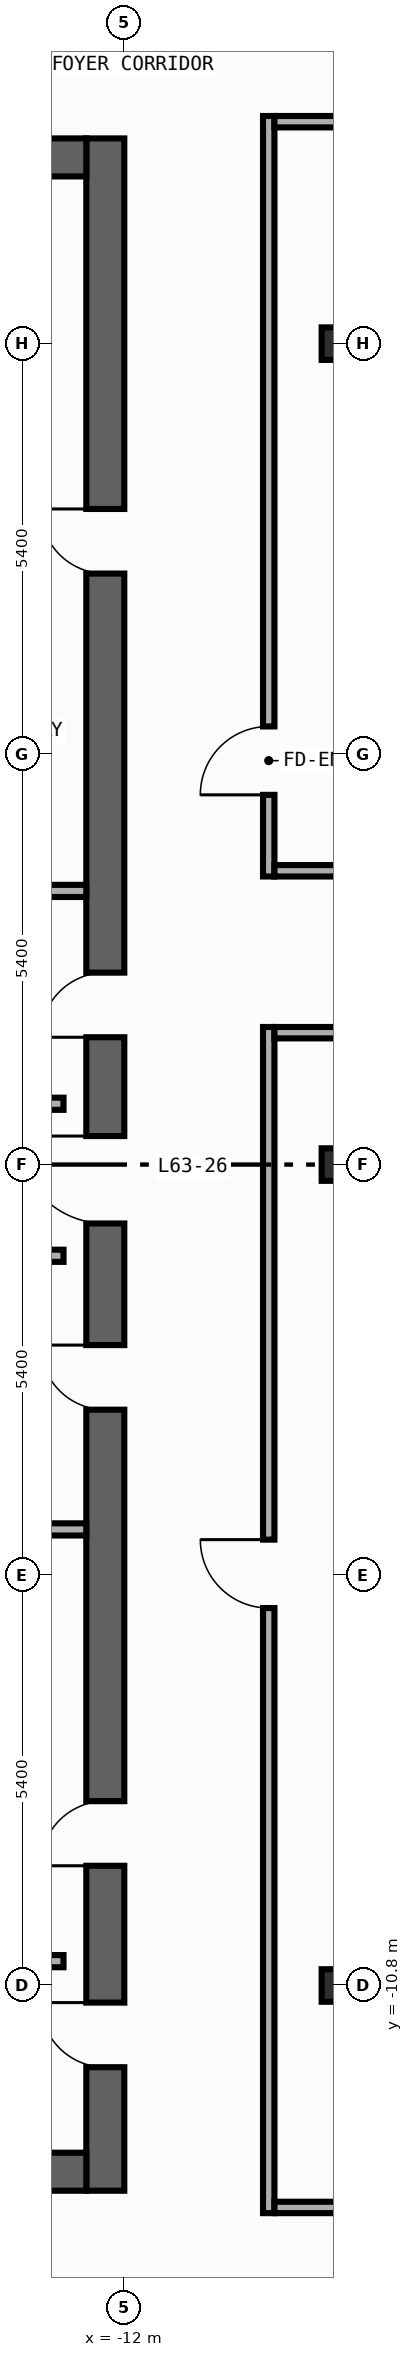
"""IFC4 building model, lengths in metres.
Left out: names, types, materials, properties, quantities, classifications, styles, units other than length and angle.
Written with IfcOpenShell. Run it as: python <this file> out.ifc"""

import sys

from ifc_helpers import new_model, si_unit, direction, frame, frame_2d, origin, origin_2d, place, context, subcontext, project, spatial, rectangle, i_section, extrude, element, fill, save


model = new_model("IFC4")
c1 = context("Model", 3, precision=1e-05, world=origin(), true_north=direction((0.0, 1.0)))
c2 = subcontext(c1, "Body", "Model", "MODEL_VIEW")
j1 = project(units=[si_unit("LENGTHUNIT", "METRE"), si_unit("PLANEANGLEUNIT", "RADIAN")], contexts=[c1])
p1 = place(None, origin())
s1 = spatial("IfcSite", under=j1, at=p1, CompositionType="ELEMENT")
p2 = place(p1, origin())
s2 = spatial("IfcBuilding", under=s1, at=p2, CompositionType="ELEMENT")
p3 = place(p2, frame((0.0, 0.0, 265.6)))
s3 = spatial("IfcBuildingStorey", under=s2, at=p3, CompositionType="ELEMENT", Elevation=265.6)
p4 = place(p3, frame((-12.25, -13.5, 0.0), z_axis=(0.0, 0.0, 1.0), x_axis=(0.0, 1.0, 0.0)))
e1 = element("IfcWall", 1, at=p4, inside=s3, PredefinedType="SHEAR", context=c2, shape_type="SweptSolid", body=[
    extrude(rectangle(XDim=27.0, YDim=0.5, at=frame_2d((13.5, 0.0))), origin(), (0.0, 0.0, 1.0), 3.34),
])
p5 = place(p4, frame((15.175, 0.0, 0.0)))
e2 = element("IfcOpeningElement", 2, at=p5, cuts=e1, PredefinedType="OPENING", context=c2, shape_type="SweptSolid", body=[
    extrude(rectangle(XDim=0.85, YDim=2.1, at=frame_2d((0.425, 1.05))), frame((0.0, 0.26, 0.0), z_axis=(0.0, -1.0, 0.0), x_axis=(1.0, 0.0, 0.0)), (0.0, 0.0, 1.0), 0.52),
])
p6 = place(p4, frame((21.275, 0.0, 0.0)))
e3 = element("IfcOpeningElement", 3, at=p6, cuts=e1, PredefinedType="OPENING", context=c2, shape_type="SweptSolid", body=[
    extrude(rectangle(XDim=0.85, YDim=2.1, at=frame_2d((0.425, 1.05))), frame((0.0, 0.26, 0.0), z_axis=(0.0, -1.0, 0.0), x_axis=(1.0, 0.0, 0.0)), (0.0, 0.0, 1.0), 0.52),
])
p7 = place(p4, frame((4.275, 0.0, 0.0)))
e4 = element("IfcOpeningElement", 4, at=p7, cuts=e1, PredefinedType="OPENING", context=c2, shape_type="SweptSolid", body=[
    extrude(rectangle(XDim=0.85, YDim=2.1, at=frame_2d((0.425, 1.05))), frame((0.0, 0.26, 0.0), z_axis=(0.0, -1.0, 0.0), x_axis=(1.0, 0.0, 0.0)), (0.0, 0.0, 1.0), 0.52),
])
p8 = place(p4, frame((10.275, 0.0, 0.0)))
e5 = element("IfcOpeningElement", 5, at=p8, cuts=e1, PredefinedType="OPENING", context=c2, shape_type="SweptSolid", body=[
    extrude(rectangle(XDim=0.85, YDim=2.1, at=frame_2d((0.425, 1.05))), frame((0.0, 0.26, 0.0), z_axis=(0.0, -1.0, 0.0), x_axis=(1.0, 0.0, 0.0)), (0.0, 0.0, 1.0), 0.52),
])
p9 = place(p4, frame((12.725, 0.0, 0.0)))
e6 = element("IfcOpeningElement", 6, at=p9, cuts=e1, PredefinedType="OPENING", context=c2, shape_type="SweptSolid", body=[
    extrude(rectangle(XDim=1.15, YDim=2.2, at=frame_2d((0.575, 1.1))), frame((0.0, 0.26, 0.0), z_axis=(0.0, -1.0, 0.0), x_axis=(1.0, 0.0, 0.0)), (0.0, 0.0, 1.0), 0.52),
])
p10 = place(p4, frame((1.625, 0.0, 0.0)))
e7 = element("IfcOpeningElement", 7, at=p10, cuts=e1, PredefinedType="OPENING", context=c2, shape_type="SweptSolid", body=[
    extrude(rectangle(XDim=0.85, YDim=2.1, at=frame_2d((0.425, 1.05))), frame((0.0, 0.26, 0.0), z_axis=(0.0, -1.0, 0.0), x_axis=(1.0, 0.0, 0.0)), (0.0, 0.0, 1.0), 0.52),
])
for number, where, z_axis, x_axis in (
    (8, (-19.9, -13.25, 0.0), (0.0, 0.0, 1.0), (1.0, 0.0, 0.0)),
    (9, (-19.9, 13.25, 0.0), (0.0, 0.0, 1.0), (1.0, 0.0, 0.0)),
):
    element("IfcWall", number, at=place(p3, frame(where, z_axis=z_axis, x_axis=x_axis)), inside=s3, PredefinedType="SHEAR", context=c2, shape_type="SweptSolid", body=[
        extrude(rectangle(XDim=7.4, YDim=0.5, at=frame_2d((3.7, 0.0))), origin(), (0.0, 0.0, 1.0), 3.34),
    ])
for number, where, z_axis, x_axis in (
    (10, (-9.2, -10.8, 0.0), (0.0, 0.0, 1.0), (1.0, 0.0, 0.0)),
    (11, (-9.2, 0.0, 0.0), (0.0, 0.0, 1.0), (1.0, 0.0, 0.0)),
    (12, (-9.2, 10.8, 0.0), (0.0, 0.0, 1.0), (1.0, 0.0, 0.0)),
):
    element("IfcColumn", number, at=place(p3, frame(where, z_axis=z_axis, x_axis=x_axis)), inside=s3, PredefinedType="COLUMN", context=c2, shape_type="SweptSolid", body=[
        extrude(i_section(OverallWidth=0.407, OverallDepth=0.428, WebThickness=0.02, FlangeThickness=0.035, FilletRadius=0.022, at=origin_2d()), origin(), (0.0, 0.0, 1.0), 3.6),
    ])
for number, where, z_axis, x_axis in (
    (13, (-15.4, 0.8, 0.0), (0.0, 0.0, 1.0), (1.0, 0.0, 0.0)),
    (14, (-15.4, -1.2, 0.0), (0.0, 0.0, 1.0), (1.0, 0.0, 0.0)),
    (15, (-15.4, -10.48, 0.0), (0.0, 0.0, 1.0), (1.0, 0.0, 0.0)),
):
    element("IfcWall", number, at=place(p3, frame(where, z_axis=z_axis, x_axis=x_axis)), inside=s3, PredefinedType="STANDARD", context=c2, shape_type="SweptSolid", body=[
        extrude(rectangle(XDim=2.6, YDim=0.16, at=frame_2d((1.3, 0.0))), origin(), (0.0, 0.0, 1.0), 3.34),
    ])
for number, where, z_axis, x_axis in (
    (16, (-15.4, 3.6, 0.0), (0.0, 0.0, 1.0), (1.0, 0.0, 0.0)),
    (17, (-15.4, -4.8, 0.0), (0.0, 0.0, 1.0), (1.0, 0.0, 0.0)),
):
    element("IfcWall", number, at=place(p3, frame(where, z_axis=z_axis, x_axis=x_axis)), inside=s3, PredefinedType="PARTITIONING", context=c2, shape_type="SweptSolid", body=[
        extrude(rectangle(XDim=2.9, YDim=0.16, at=frame_2d((1.45, 0.0))), origin(), (0.0, 0.0, 1.0), 3.34),
    ])
p11 = place(p3, frame((-10.1, 3.79, 0.0), z_axis=(0.0, 0.0, 1.0), x_axis=(0.0, 1.0, 0.0)))
e18 = element("IfcWall", 18, at=p11, inside=s3, PredefinedType="PARTITIONING", context=c2, shape_type="SweptSolid", body=[
    extrude(rectangle(XDim=10.005, YDim=0.15, at=frame_2d((5.002, 0.0))), origin(), (0.0, 0.0, 1.0), 3.34),
])
p12 = place(p11, frame((1.074, 0.0, 0.0)))
e19 = element("IfcOpeningElement", 19, at=p12, cuts=e18, PredefinedType="OPENING", context=c2, shape_type="SweptSolid", body=[
    extrude(rectangle(XDim=0.9, YDim=2.15, at=frame_2d((0.45, 1.075))), frame((0.0, 0.085, 0.0), z_axis=(0.0, -1.0, 0.0), x_axis=(1.0, 0.0, 0.0)), (0.0, 0.0, 1.0), 0.17),
])
p13 = place(p3, frame((-10.1, -13.795, 0.0), z_axis=(0.0, 0.0, 1.0), x_axis=(0.0, 1.0, 0.0)))
e20 = element("IfcWall", 20, at=p13, inside=s3, PredefinedType="PARTITIONING", context=c2, shape_type="SweptSolid", body=[
    extrude(rectangle(XDim=15.605, YDim=0.15, at=frame_2d((7.802, 0.0))), origin(), (0.0, 0.0, 1.0), 3.34),
])
p14 = place(p13, frame((7.961, 0.0, 0.0)))
e21 = element("IfcOpeningElement", 21, at=p14, cuts=e20, PredefinedType="OPENING", context=c2, shape_type="SweptSolid", body=[
    extrude(rectangle(XDim=0.9, YDim=2.15, at=frame_2d((0.45, 1.075))), frame((0.0, 0.085, 0.0), z_axis=(0.0, -1.0, 0.0), x_axis=(1.0, 0.0, 0.0)), (0.0, 0.0, 1.0), 0.17),
])
p15 = place(p3, frame((-10.025, 3.865, 0.0), z_axis=(0.0, 0.0, 1.0), x_axis=(1.0, 0.0, 0.0)))
e22 = element("IfcWall", 22, at=p15, inside=s3, PredefinedType="PARTITIONING", context=c2, shape_type="SweptSolid", body=[
    extrude(rectangle(XDim=12.055, YDim=0.15, at=frame_2d((6.027, 0.0))), origin(), (0.0, 0.0, 1.0), 3.34),
])
p16 = place(p15, frame((9.491, 0.0, 0.0)))
e23 = element("IfcOpeningElement", 23, at=p16, cuts=e22, PredefinedType="OPENING", context=c2, shape_type="SweptSolid", body=[
    extrude(rectangle(XDim=0.9, YDim=2.15, at=frame_2d((0.45, 1.075))), frame((0.0, 0.085, 0.0), z_axis=(0.0, -1.0, 0.0), x_axis=(1.0, 0.0, 0.0)), (0.0, 0.0, 1.0), 0.17),
])
p17 = place(p3, frame((-10.025, 1.735, 0.0), z_axis=(0.0, 0.0, 1.0), x_axis=(1.0, 0.0, 0.0)))
e24 = element("IfcWall", 24, at=p17, inside=s3, PredefinedType="PARTITIONING", context=c2, shape_type="SweptSolid", body=[
    extrude(rectangle(XDim=12.035, YDim=0.15, at=frame_2d((6.018, 0.0))), origin(), (0.0, 0.0, 1.0), 3.34),
])
p18 = place(p17, frame((9.674, 0.0, 0.0)))
e25 = element("IfcOpeningElement", 25, at=p18, cuts=e24, PredefinedType="OPENING", context=c2, shape_type="SweptSolid", body=[
    extrude(rectangle(XDim=0.9, YDim=2.15, at=frame_2d((0.45, 1.075))), frame((0.0, 0.085, 0.0), z_axis=(0.0, -1.0, 0.0), x_axis=(1.0, 0.0, 0.0)), (0.0, 0.0, 1.0), 0.17),
])
p19 = place(p3, frame((-10.025, 13.72, 0.0), z_axis=(0.0, 0.0, 1.0), x_axis=(1.0, 0.0, 0.0)))
e26 = element("IfcWall", 26, at=p19, inside=s3, PredefinedType="PARTITIONING", context=c2, shape_type="SweptSolid", body=[
    extrude(rectangle(XDim=12.055, YDim=0.15, at=frame_2d((6.027, 0.0))), origin(), (0.0, 0.0, 1.0), 3.34),
])
p20 = place(p19, frame((7.283, 0.0, 0.0)))
e27 = element("IfcOpeningElement", 27, at=p20, cuts=e26, PredefinedType="OPENING", context=c2, shape_type="SweptSolid", body=[
    extrude(rectangle(XDim=0.9, YDim=2.15, at=frame_2d((0.45, 1.075))), frame((0.0, 0.085, 0.0), z_axis=(0.0, -1.0, 0.0), x_axis=(1.0, 0.0, 0.0)), (0.0, 0.0, 1.0), 0.17),
])
p21 = place(p3, frame((-10.025, -13.72, 0.0), z_axis=(0.0, 0.0, 1.0), x_axis=(1.0, 0.0, 0.0)))
e28 = element("IfcWall", 28, at=p21, inside=s3, PredefinedType="PARTITIONING", context=c2, shape_type="SweptSolid", body=[
    extrude(rectangle(XDim=11.885, YDim=0.15, at=frame_2d((5.942, 0.0))), origin(), (0.0, 0.0, 1.0), 3.34),
])
p22 = place(p21, frame((7.304, 0.0, 0.0)))
e29 = element("IfcOpeningElement", 29, at=p22, cuts=e28, PredefinedType="OPENING", context=c2, shape_type="SweptSolid", body=[
    extrude(rectangle(XDim=0.9, YDim=2.15, at=frame_2d((0.45, 1.075))), frame((0.0, 0.085, 0.0), z_axis=(0.0, -1.0, 0.0), x_axis=(1.0, 0.0, 0.0)), (0.0, 0.0, 1.0), 0.17),
])
p23 = place(p5, origin())
e30 = element("IfcDoor", 30, at=p23, inside=s3, OperationType="SINGLE_SWING_LEFT", PredefinedType="DOOR", context=c2, shape_type="SweptSolid", body=[
    extrude(rectangle(XDim=0.85, YDim=2.1, at=frame_2d((0.425, 1.05))), frame((0.0, 0.025, 0.0), z_axis=(0.0, -1.0, 0.0), x_axis=(1.0, 0.0, 0.0)), (0.0, 0.0, 1.0), 0.05),
])
fill(e2, e30)
p24 = place(p6, origin())
e31 = element("IfcDoor", 31, at=p24, inside=s3, OperationType="SINGLE_SWING_RIGHT", PredefinedType="DOOR", context=c2, shape_type="SweptSolid", body=[
    extrude(rectangle(XDim=0.85, YDim=2.1, at=frame_2d((0.425, 1.05))), frame((0.0, 0.025, 0.0), z_axis=(0.0, -1.0, 0.0), x_axis=(1.0, 0.0, 0.0)), (0.0, 0.0, 1.0), 0.05),
])
fill(e3, e31)
p25 = place(p7, origin())
e32 = element("IfcDoor", 32, at=p25, inside=s3, OperationType="SINGLE_SWING_LEFT", PredefinedType="DOOR", context=c2, shape_type="SweptSolid", body=[
    extrude(rectangle(XDim=0.85, YDim=2.1, at=frame_2d((0.425, 1.05))), frame((0.0, 0.025, 0.0), z_axis=(0.0, -1.0, 0.0), x_axis=(1.0, 0.0, 0.0)), (0.0, 0.0, 1.0), 0.05),
])
fill(e4, e32)
p26 = place(p8, origin())
e33 = element("IfcDoor", 33, at=p26, inside=s3, OperationType="SINGLE_SWING_RIGHT", PredefinedType="DOOR", context=c2, shape_type="SweptSolid", body=[
    extrude(rectangle(XDim=0.85, YDim=2.1, at=frame_2d((0.425, 1.05))), frame((0.0, 0.025, 0.0), z_axis=(0.0, -1.0, 0.0), x_axis=(1.0, 0.0, 0.0)), (0.0, 0.0, 1.0), 0.05),
])
fill(e5, e33)
p27 = place(p9, origin())
e34 = element("IfcDoor", 34, at=p27, inside=s3, OperationType="SINGLE_SWING_RIGHT", PredefinedType="DOOR", context=c2, shape_type="SweptSolid", body=[
    extrude(rectangle(XDim=1.15, YDim=2.2, at=frame_2d((0.575, 1.1))), frame((0.0, 0.025, 0.0), z_axis=(0.0, -1.0, 0.0), x_axis=(1.0, 0.0, 0.0)), (0.0, 0.0, 1.0), 0.05),
])
fill(e6, e34)
p28 = place(p10, origin())
e35 = element("IfcDoor", 35, at=p28, inside=s3, OperationType="SINGLE_SWING_RIGHT", PredefinedType="DOOR", context=c2, shape_type="SweptSolid", body=[
    extrude(rectangle(XDim=0.85, YDim=2.1, at=frame_2d((0.425, 1.05))), frame((0.0, 0.025, 0.0), z_axis=(0.0, -1.0, 0.0), x_axis=(1.0, 0.0, 0.0)), (0.0, 0.0, 1.0), 0.05),
])
fill(e7, e35)
p29 = place(p12, origin())
e36 = element("IfcDoor", 36, at=p29, inside=s3, OperationType="SINGLE_SWING_LEFT", PredefinedType="DOOR", context=c2, shape_type="SweptSolid", body=[
    extrude(rectangle(XDim=0.9, YDim=2.15, at=frame_2d((0.45, 1.075))), frame((0.0, 0.025, 0.0), z_axis=(0.0, -1.0, 0.0), x_axis=(1.0, 0.0, 0.0)), (0.0, 0.0, 1.0), 0.05),
])
fill(e19, e36)
p30 = place(p14, origin())
e37 = element("IfcDoor", 37, at=p30, inside=s3, OperationType="SINGLE_SWING_RIGHT", PredefinedType="DOOR", context=c2, shape_type="SweptSolid", body=[
    extrude(rectangle(XDim=0.9, YDim=2.15, at=frame_2d((0.45, 1.075))), frame((0.0, 0.025, 0.0), z_axis=(0.0, -1.0, 0.0), x_axis=(1.0, 0.0, 0.0)), (0.0, 0.0, 1.0), 0.05),
])
fill(e21, e37)
save(model, sys.argv[1])
